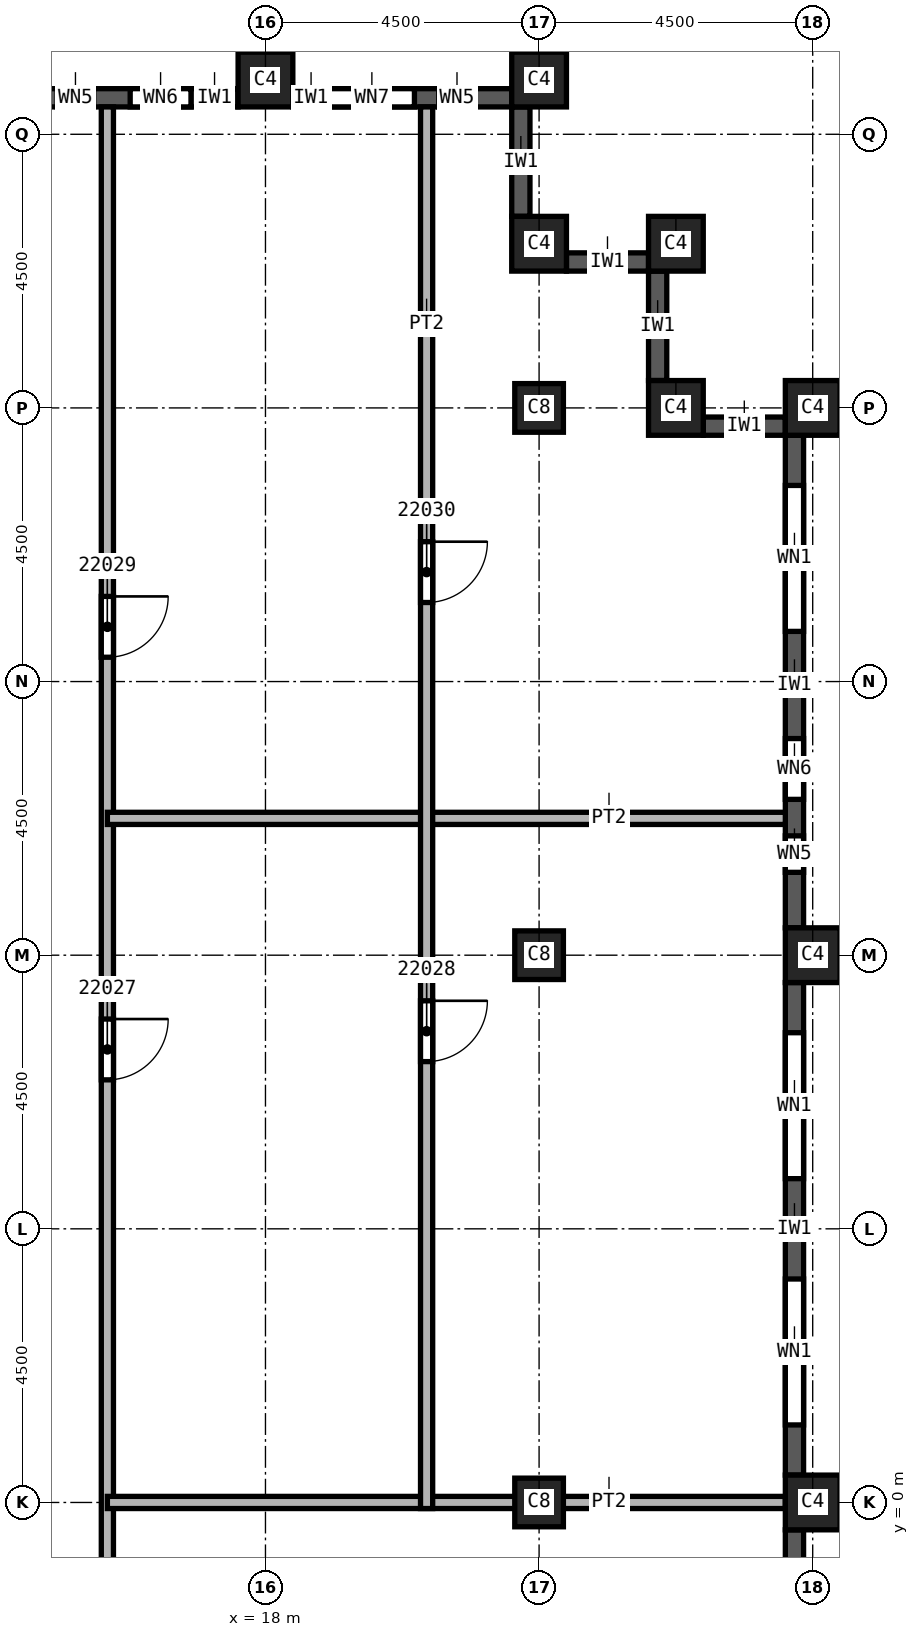
"""IFC4 building model, lengths in metres.
Left out: names, types, materials, properties, quantities, classifications, styles, units other than length and angle.
Written with IfcOpenShell. Run it as: python <this file> out.ifc"""

import sys

from ifc_helpers import new_model, si_unit, direction, frame, frame_2d, origin, origin_2d, place, context, subcontext, project, spatial, rectangle, extrude, element, fill, save


model = new_model("IFC4")
c1 = context("Model", 3, precision=1e-05, world=origin(), true_north=direction((0.0, 1.0)))
c2 = subcontext(c1, "Body", "Model", "MODEL_VIEW")
j1 = project(units=[si_unit("LENGTHUNIT", "METRE"), si_unit("PLANEANGLEUNIT", "RADIAN")], contexts=[c1])
p1 = place(None, origin())
s1 = spatial("IfcSite", under=j1, at=p1, CompositionType="ELEMENT")
p2 = place(p1, origin())
s2 = spatial("IfcBuilding", under=s1, at=p2, CompositionType="ELEMENT")
p3 = place(p2, frame((0.0, 0.0, 312.0)))
s3 = spatial("IfcBuildingStorey", under=s2, at=p3, CompositionType="ELEMENT", Elevation=312.0)
for number, where, z_axis, x_axis in (
    (1, (22.5, 0.0, 0.0), (0.0, 0.0, 1.0), (1.0, 0.0, 0.0)),
    (2, (22.5, 9.0, 0.0), (0.0, 0.0, 1.0), (1.0, 0.0, 0.0)),
    (3, (22.5, 18.0, 0.0), (0.0, 0.0, 1.0), (1.0, 0.0, 0.0)),
):
    element("IfcColumn", number, at=place(p3, frame(where, z_axis=z_axis, x_axis=x_axis)), inside=s3, PredefinedType="COLUMN", context=c2, shape_type="SweptSolid", body=[
        extrude(rectangle(XDim=0.8, YDim=0.8, at=origin_2d()), origin(), (0.0, 0.0, 1.0), 3.74),
    ])
for number, where, z_axis, x_axis in (
    (4, (27.0, 0.0, 0.0), (0.0, 0.0, 1.0), (0.0, 1.0, 0.0)),
    (5, (27.0, 9.0, 0.0), (0.0, 0.0, 1.0), (0.0, 1.0, 0.0)),
    (6, (27.0, 18.0, 0.0), (0.0, 0.0, 1.0), (0.0, 1.0, 0.0)),
    (7, (18.0, 23.4, 0.0), (0.0, 0.0, 1.0), (1.0, 0.0, 0.0)),
    (8, (22.5, 23.4, 0.0), (0.0, 0.0, 1.0), (1.0, 0.0, 0.0)),
    (9, (22.5, 20.7, 0.0), (0.0, 0.0, 1.0), (1.0, 0.0, 0.0)),
    (10, (24.75, 20.7, 0.0), (0.0, 0.0, 1.0), (1.0, 0.0, 0.0)),
    (11, (24.75, 18.0, 0.0), (0.0, 0.0, 1.0), (1.0, 0.0, 0.0)),
):
    element("IfcColumn", number, at=place(p3, frame(where, z_axis=z_axis, x_axis=x_axis)), inside=s3, PredefinedType="COLUMN", context=c2, shape_type="SweptSolid", body=[
        extrude(rectangle(XDim=0.9, YDim=0.9, at=origin_2d()), origin(), (0.0, 0.0, 1.0), 3.74),
    ])
p4 = place(p3, frame((26.7, -8.55, 0.0), z_axis=(0.0, 0.0, 1.0), x_axis=(0.0, 1.0, 0.0)))
e12 = element("IfcWall", 12, at=p4, inside=s3, PredefinedType="SOLIDWALL", context=c2, shape_type="SweptSolid", body=[
    extrude(rectangle(XDim=8.1, YDim=0.3, at=frame_2d((4.05, 0.0))), origin(), (0.0, 0.0, 1.0), 3.14),
])
p5 = place(p4, frame((0.825, 0.0, 0.8)))
e13 = element("IfcOpeningElement", 13, at=p5, cuts=e12, PredefinedType="OPENING", context=c2, shape_type="SweptSolid", body=[
    extrude(rectangle(XDim=2.4, YDim=1.95, at=frame_2d((1.2, 0.975))), frame((0.0, 0.15, 0.0), z_axis=(0.0, -1.0, 0.0), x_axis=(1.0, 0.0, 0.0)), (0.0, 0.0, 1.0), 0.3),
])
p6 = place(p4, frame((4.875, 0.0, 0.8)))
e14 = element("IfcOpeningElement", 14, at=p6, cuts=e12, PredefinedType="OPENING", context=c2, shape_type="SweptSolid", body=[
    extrude(rectangle(XDim=2.4, YDim=1.95, at=frame_2d((1.2, 0.975))), frame((0.0, 0.15, 0.0), z_axis=(0.0, -1.0, 0.0), x_axis=(1.0, 0.0, 0.0)), (0.0, 0.0, 1.0), 0.3),
])
p7 = place(p3, frame((26.7, 0.45, 0.0), z_axis=(0.0, 0.0, 1.0), x_axis=(0.0, 1.0, 0.0)))
e15 = element("IfcWall", 15, at=p7, inside=s3, PredefinedType="SOLIDWALL", context=c2, shape_type="SweptSolid", body=[
    extrude(rectangle(XDim=8.1, YDim=0.3, at=frame_2d((4.05, 0.0))), origin(), (0.0, 0.0, 1.0), 3.14),
])
p8 = place(p7, frame((0.825, 0.0, 0.8)))
e16 = element("IfcOpeningElement", 16, at=p8, cuts=e15, PredefinedType="OPENING", context=c2, shape_type="SweptSolid", body=[
    extrude(rectangle(XDim=2.4, YDim=1.95, at=frame_2d((1.2, 0.975))), frame((0.0, 0.15, 0.0), z_axis=(0.0, -1.0, 0.0), x_axis=(1.0, 0.0, 0.0)), (0.0, 0.0, 1.0), 0.3),
])
p9 = place(p7, frame((4.875, 0.0, 0.8)))
e17 = element("IfcOpeningElement", 17, at=p9, cuts=e15, PredefinedType="OPENING", context=c2, shape_type="SweptSolid", body=[
    extrude(rectangle(XDim=2.4, YDim=1.95, at=frame_2d((1.2, 0.975))), frame((0.0, 0.15, 0.0), z_axis=(0.0, -1.0, 0.0), x_axis=(1.0, 0.0, 0.0)), (0.0, 0.0, 1.0), 0.3),
])
p10 = place(p3, frame((26.7, 9.45, 0.0), z_axis=(0.0, 0.0, 1.0), x_axis=(0.0, 1.0, 0.0)))
e18 = element("IfcWall", 18, at=p10, inside=s3, PredefinedType="SOLIDWALL", context=c2, shape_type="SweptSolid", body=[
    extrude(rectangle(XDim=8.1, YDim=0.3, at=frame_2d((4.05, 0.0))), origin(), (0.0, 0.0, 1.0), 3.14),
])
p11 = place(p10, frame((4.875, 0.0, 0.8)))
e19 = element("IfcOpeningElement", 19, at=p11, cuts=e18, PredefinedType="OPENING", context=c2, shape_type="SweptSolid", body=[
    extrude(rectangle(XDim=2.4, YDim=1.95, at=frame_2d((1.2, 0.975))), frame((0.0, 0.15, 0.0), z_axis=(0.0, -1.0, 0.0), x_axis=(1.0, 0.0, 0.0)), (0.0, 0.0, 1.0), 0.3),
])
p12 = place(p10, frame((0.913, 0.0, 0.8)))
e20 = element("IfcOpeningElement", 20, at=p12, cuts=e18, PredefinedType="OPENING", context=c2, shape_type="SweptSolid", body=[
    extrude(rectangle(XDim=0.6, YDim=1.95, at=frame_2d((0.3, 0.975))), frame((0.0, 0.15, 0.0), z_axis=(0.0, -1.0, 0.0), x_axis=(1.0, 0.0, 0.0)), (0.0, 0.0, 1.0), 0.3),
])
p13 = place(p10, frame((2.113, 0.0, 0.8)))
e21 = element("IfcOpeningElement", 21, at=p13, cuts=e18, PredefinedType="OPENING", context=c2, shape_type="SweptSolid", body=[
    extrude(rectangle(XDim=1.0, YDim=1.95, at=frame_2d((0.5, 0.975))), frame((0.0, 0.15, 0.0), z_axis=(0.0, -1.0, 0.0), x_axis=(1.0, 0.0, 0.0)), (0.0, 0.0, 1.0), 0.3),
])
p14 = place(p3, frame((26.55, 17.7, 0.0), z_axis=(0.0, 0.0, 1.0), x_axis=(-1.0, 0.0, 0.0)))
e22 = element("IfcWall", 22, at=p14, inside=s3, PredefinedType="SOLIDWALL", context=c2, shape_type="SweptSolid", body=[
    extrude(rectangle(XDim=1.35, YDim=0.3, at=frame_2d((0.675, 0.0))), origin(), (0.0, 0.0, 1.0), 3.14),
])
p15 = place(p3, frame((24.45, 18.45, 0.0), z_axis=(0.0, 0.0, 1.0), x_axis=(0.0, 1.0, 0.0)))
e23 = element("IfcWall", 23, at=p15, inside=s3, PredefinedType="SOLIDWALL", context=c2, shape_type="SweptSolid", body=[
    extrude(rectangle(XDim=1.8, YDim=0.3, at=frame_2d((0.9, 0.0))), origin(), (0.0, 0.0, 1.0), 3.14),
])
p16 = place(p3, frame((24.3, 20.4, 0.0), z_axis=(0.0, 0.0, 1.0), x_axis=(-1.0, 0.0, 0.0)))
e24 = element("IfcWall", 24, at=p16, inside=s3, PredefinedType="SOLIDWALL", context=c2, shape_type="SweptSolid", body=[
    extrude(rectangle(XDim=1.35, YDim=0.3, at=frame_2d((0.675, 0.0))), origin(), (0.0, 0.0, 1.0), 3.14),
])
p17 = place(p3, frame((22.2, 21.15, 0.0), z_axis=(0.0, 0.0, 1.0), x_axis=(0.0, 1.0, 0.0)))
e25 = element("IfcWall", 25, at=p17, inside=s3, PredefinedType="SOLIDWALL", context=c2, shape_type="SweptSolid", body=[
    extrude(rectangle(XDim=1.8, YDim=0.3, at=frame_2d((0.9, 0.0))), origin(), (0.0, 0.0, 1.0), 3.14),
])
p18 = place(p3, frame((22.05, 23.1, 0.0), z_axis=(0.0, 0.0, 1.0), x_axis=(-1.0, 0.0, 0.0)))
e26 = element("IfcWall", 26, at=p18, inside=s3, PredefinedType="SOLIDWALL", context=c2, shape_type="SweptSolid", body=[
    extrude(rectangle(XDim=3.6, YDim=0.3, at=frame_2d((1.8, 0.0))), origin(), (0.0, 0.0, 1.0), 3.14),
])
p19 = place(p18, frame((0.6, 0.0, 0.8)))
e27 = element("IfcOpeningElement", 27, at=p19, cuts=e26, PredefinedType="OPENING", context=c2, shape_type="SweptSolid", body=[
    extrude(rectangle(XDim=0.6, YDim=1.95, at=frame_2d((0.3, 0.975))), frame((0.0, 0.15, 0.0), z_axis=(0.0, -1.0, 0.0), x_axis=(1.0, 0.0, 0.0)), (0.0, 0.0, 1.0), 0.3),
])
p20 = place(p18, frame((1.6, 0.0, 0.8)))
e28 = element("IfcOpeningElement", 28, at=p20, cuts=e26, PredefinedType="OPENING", context=c2, shape_type="SweptSolid", body=[
    extrude(rectangle(XDim=1.4, YDim=1.95, at=frame_2d((0.7, 0.975))), frame((0.0, 0.15, 0.0), z_axis=(0.0, -1.0, 0.0), x_axis=(1.0, 0.0, 0.0)), (0.0, 0.0, 1.0), 0.3),
])
p21 = place(p3, frame((17.55, 23.1, 0.0), z_axis=(0.0, 0.0, 1.0), x_axis=(-1.0, 0.0, 0.0)))
e29 = element("IfcWall", 29, at=p21, inside=s3, PredefinedType="SOLIDWALL", context=c2, shape_type="SweptSolid", body=[
    extrude(rectangle(XDim=3.6, YDim=0.3, at=frame_2d((1.8, 0.0))), origin(), (0.0, 0.0, 1.0), 3.14),
])
p22 = place(p21, frame((0.775, 0.0, 0.8)))
e30 = element("IfcOpeningElement", 30, at=p22, cuts=e29, PredefinedType="OPENING", context=c2, shape_type="SweptSolid", body=[
    extrude(rectangle(XDim=1.0, YDim=1.95, at=frame_2d((0.5, 0.975))), frame((0.0, 0.15, 0.0), z_axis=(0.0, -1.0, 0.0), x_axis=(1.0, 0.0, 0.0)), (0.0, 0.0, 1.0), 0.3),
])
p23 = place(p21, frame((2.375, 0.0, 0.8)))
e31 = element("IfcOpeningElement", 31, at=p23, cuts=e29, PredefinedType="OPENING", context=c2, shape_type="SweptSolid", body=[
    extrude(rectangle(XDim=0.6, YDim=1.95, at=frame_2d((0.3, 0.975))), frame((0.0, 0.15, 0.0), z_axis=(0.0, -1.0, 0.0), x_axis=(1.0, 0.0, 0.0)), (0.0, 0.0, 1.0), 0.3),
])
p24 = place(p3, frame((15.4, 22.95, 0.0), z_axis=(0.0, 0.0, 1.0), x_axis=(0.0, -1.0, 0.0)))
e32 = element("IfcWall", 32, at=p24, inside=s3, PredefinedType="PARTITIONING", context=c2, shape_type="SweptSolid", body=[
    extrude(rectangle(XDim=45.9, YDim=0.2, at=frame_2d((22.95, 0.0))), origin(), (0.0, 0.0, 1.0), 3.74),
])
p25 = place(p24, frame((15.0, 0.0, 0.0)))
e33 = element("IfcOpeningElement", 33, at=p25, cuts=e32, PredefinedType="OPENING", context=c2, shape_type="SweptSolid", body=[
    extrude(rectangle(XDim=1.0, YDim=2.1, at=frame_2d((0.5, 1.05))), frame((0.0, 0.1, 0.0), z_axis=(0.0, -1.0, 0.0), x_axis=(1.0, 0.0, 0.0)), (0.0, 0.0, 1.0), 0.2),
])
p26 = place(p24, frame((8.05, 0.0, 0.0)))
e34 = element("IfcOpeningElement", 34, at=p26, cuts=e32, PredefinedType="OPENING", context=c2, shape_type="SweptSolid", body=[
    extrude(rectangle(XDim=1.0, YDim=2.1, at=frame_2d((0.5, 1.05))), frame((0.0, 0.1, 0.0), z_axis=(0.0, -1.0, 0.0), x_axis=(1.0, 0.0, 0.0)), (0.0, 0.0, 1.0), 0.2),
])
p27 = place(p24, frame((43.8, 0.0, 0.0)))
e35 = element("IfcOpeningElement", 35, at=p27, cuts=e32, PredefinedType="OPENING", context=c2, shape_type="SweptSolid", body=[
    extrude(rectangle(XDim=1.0, YDim=2.1, at=frame_2d((0.5, 1.05))), frame((0.0, 0.1, 0.0), z_axis=(0.0, -1.0, 0.0), x_axis=(1.0, 0.0, 0.0)), (0.0, 0.0, 1.0), 0.2),
])
p28 = place(p24, frame((30.3, 0.0, 0.0)))
e36 = element("IfcOpeningElement", 36, at=p28, cuts=e32, PredefinedType="OPENING", context=c2, shape_type="SweptSolid", body=[
    extrude(rectangle(XDim=1.0, YDim=2.1, at=frame_2d((0.5, 1.05))), frame((0.0, 0.1, 0.0), z_axis=(0.0, -1.0, 0.0), x_axis=(1.0, 0.0, 0.0)), (0.0, 0.0, 1.0), 0.2),
])
for number, where, z_axis, x_axis in (
    (37, (15.4, 11.25, 0.0), (0.0, 0.0, 1.0), (1.0, 0.0, 0.0)),
    (38, (26.55, 0.0, 0.0), (0.0, 0.0, 1.0), (-1.0, 0.0, 0.0)),
):
    element("IfcWall", number, at=place(p3, frame(where, z_axis=z_axis, x_axis=x_axis)), inside=s3, PredefinedType="PARTITIONING", context=c2, shape_type="SweptSolid", body=[
        extrude(rectangle(XDim=11.15, YDim=0.2, at=frame_2d((5.575, 0.0))), origin(), (0.0, 0.0, 1.0), 3.74),
    ])
p29 = place(p3, frame((20.65, 22.95, 0.0), z_axis=(0.0, 0.0, 1.0), x_axis=(0.0, -1.0, 0.0)))
e39 = element("IfcWall", 39, at=p29, inside=s3, PredefinedType="PARTITIONING", context=c2, shape_type="SweptSolid", body=[
    extrude(rectangle(XDim=23.05, YDim=0.2, at=frame_2d((11.525, 0.0))), origin(), (0.0, 0.0, 1.0), 3.74),
])
p30 = place(p29, frame((14.7, 0.0, 0.0)))
e40 = element("IfcOpeningElement", 40, at=p30, cuts=e39, PredefinedType="OPENING", context=c2, shape_type="SweptSolid", body=[
    extrude(rectangle(XDim=1.0, YDim=2.1, at=frame_2d((0.5, 1.05))), frame((0.0, 0.1, 0.0), z_axis=(0.0, -1.0, 0.0), x_axis=(1.0, 0.0, 0.0)), (0.0, 0.0, 1.0), 0.2),
])
p31 = place(p29, frame((7.15, 0.0, 0.0)))
e41 = element("IfcOpeningElement", 41, at=p31, cuts=e39, PredefinedType="OPENING", context=c2, shape_type="SweptSolid", body=[
    extrude(rectangle(XDim=1.0, YDim=2.1, at=frame_2d((0.5, 1.05))), frame((0.0, 0.1, 0.0), z_axis=(0.0, -1.0, 0.0), x_axis=(1.0, 0.0, 0.0)), (0.0, 0.0, 1.0), 0.2),
])
p32 = place(p8, origin())
e42 = element("IfcWindow", 42, at=p32, inside=s3, PartitioningType="SINGLE_PANEL", PredefinedType="WINDOW", context=c2, shape_type="SweptSolid", body=[
    extrude(rectangle(XDim=2.4, YDim=1.95, at=frame_2d((1.2, 0.975))), frame((0.0, 0.03, 0.0), z_axis=(0.0, -1.0, 0.0), x_axis=(1.0, 0.0, 0.0)), (0.0, 0.0, 1.0), 0.06),
])
fill(e16, e42)
p33 = place(p9, origin())
e43 = element("IfcWindow", 43, at=p33, inside=s3, PartitioningType="SINGLE_PANEL", PredefinedType="WINDOW", context=c2, shape_type="SweptSolid", body=[
    extrude(rectangle(XDim=2.4, YDim=1.95, at=frame_2d((1.2, 0.975))), frame((0.0, 0.03, 0.0), z_axis=(0.0, -1.0, 0.0), x_axis=(1.0, 0.0, 0.0)), (0.0, 0.0, 1.0), 0.06),
])
fill(e17, e43)
p34 = place(p11, origin())
e44 = element("IfcWindow", 44, at=p34, inside=s3, PartitioningType="SINGLE_PANEL", PredefinedType="WINDOW", context=c2, shape_type="SweptSolid", body=[
    extrude(rectangle(XDim=2.4, YDim=1.95, at=frame_2d((1.2, 0.975))), frame((0.0, 0.03, 0.0), z_axis=(0.0, -1.0, 0.0), x_axis=(1.0, 0.0, 0.0)), (0.0, 0.0, 1.0), 0.06),
])
fill(e19, e44)
p35 = place(p25, origin())
e45 = element("IfcDoor", 45, at=p35, inside=s3, OperationType="SINGLE_SWING_RIGHT", PredefinedType="DOOR", context=c2, shape_type="SweptSolid", body=[
    extrude(rectangle(XDim=1.0, YDim=2.1, at=frame_2d((0.5, 1.05))), frame((0.0, 0.025, 0.0), z_axis=(0.0, -1.0, 0.0), x_axis=(1.0, 0.0, 0.0)), (0.0, 0.0, 1.0), 0.05),
])
fill(e33, e45)
p36 = place(p30, origin())
e46 = element("IfcDoor", 46, at=p36, inside=s3, OperationType="SINGLE_SWING_LEFT", PredefinedType="DOOR", context=c2, shape_type="SweptSolid", body=[
    extrude(rectangle(XDim=1.0, YDim=2.1, at=frame_2d((0.5, 1.05))), frame((0.0, 0.025, 0.0), z_axis=(0.0, -1.0, 0.0), x_axis=(1.0, 0.0, 0.0)), (0.0, 0.0, 1.0), 0.05),
])
fill(e40, e46)
p37 = place(p26, origin())
e47 = element("IfcDoor", 47, at=p37, inside=s3, OperationType="SINGLE_SWING_RIGHT", PredefinedType="DOOR", context=c2, shape_type="SweptSolid", body=[
    extrude(rectangle(XDim=1.0, YDim=2.1, at=frame_2d((0.5, 1.05))), frame((0.0, 0.025, 0.0), z_axis=(0.0, -1.0, 0.0), x_axis=(1.0, 0.0, 0.0)), (0.0, 0.0, 1.0), 0.05),
])
fill(e34, e47)
p38 = place(p31, origin())
e48 = element("IfcDoor", 48, at=p38, inside=s3, OperationType="SINGLE_SWING_LEFT", PredefinedType="DOOR", context=c2, shape_type="SweptSolid", body=[
    extrude(rectangle(XDim=1.0, YDim=2.1, at=frame_2d((0.5, 1.05))), frame((0.0, 0.025, 0.0), z_axis=(0.0, -1.0, 0.0), x_axis=(1.0, 0.0, 0.0)), (0.0, 0.0, 1.0), 0.05),
])
fill(e41, e48)
p39 = place(p12, origin())
e49 = element("IfcWindow", 49, at=p39, inside=s3, PartitioningType="SINGLE_PANEL", PredefinedType="WINDOW", context=c2, shape_type="SweptSolid", body=[
    extrude(rectangle(XDim=0.6, YDim=1.95, at=frame_2d((0.3, 0.975))), frame((0.0, 0.03, 0.0), z_axis=(0.0, -1.0, 0.0), x_axis=(1.0, 0.0, 0.0)), (0.0, 0.0, 1.0), 0.06),
])
fill(e20, e49)
p40 = place(p13, origin())
e50 = element("IfcWindow", 50, at=p40, inside=s3, PartitioningType="SINGLE_PANEL", PredefinedType="WINDOW", context=c2, shape_type="SweptSolid", body=[
    extrude(rectangle(XDim=1.0, YDim=1.95, at=frame_2d((0.5, 0.975))), frame((0.0, 0.03, 0.0), z_axis=(0.0, -1.0, 0.0), x_axis=(1.0, 0.0, 0.0)), (0.0, 0.0, 1.0), 0.06),
])
fill(e21, e50)
p41 = place(p19, origin())
e51 = element("IfcWindow", 51, at=p41, inside=s3, PartitioningType="SINGLE_PANEL", PredefinedType="WINDOW", context=c2, shape_type="SweptSolid", body=[
    extrude(rectangle(XDim=0.6, YDim=1.95, at=frame_2d((0.3, 0.975))), frame((0.0, 0.03, 0.0), z_axis=(0.0, -1.0, 0.0), x_axis=(1.0, 0.0, 0.0)), (0.0, 0.0, 1.0), 0.06),
])
fill(e27, e51)
p42 = place(p20, origin())
e52 = element("IfcWindow", 52, at=p42, inside=s3, PartitioningType="SINGLE_PANEL", PredefinedType="WINDOW", context=c2, shape_type="SweptSolid", body=[
    extrude(rectangle(XDim=1.4, YDim=1.95, at=frame_2d((0.7, 0.975))), frame((0.0, 0.03, 0.0), z_axis=(0.0, -1.0, 0.0), x_axis=(1.0, 0.0, 0.0)), (0.0, 0.0, 1.0), 0.06),
])
fill(e28, e52)
p43 = place(p22, origin())
e53 = element("IfcWindow", 53, at=p43, inside=s3, PartitioningType="SINGLE_PANEL", PredefinedType="WINDOW", context=c2, shape_type="SweptSolid", body=[
    extrude(rectangle(XDim=1.0, YDim=1.95, at=frame_2d((0.5, 0.975))), frame((0.0, 0.03, 0.0), z_axis=(0.0, -1.0, 0.0), x_axis=(1.0, 0.0, 0.0)), (0.0, 0.0, 1.0), 0.06),
])
fill(e30, e53)
p44 = place(p23, origin())
e54 = element("IfcWindow", 54, at=p44, inside=s3, PartitioningType="SINGLE_PANEL", PredefinedType="WINDOW", context=c2, shape_type="SweptSolid", body=[
    extrude(rectangle(XDim=0.6, YDim=1.95, at=frame_2d((0.3, 0.975))), frame((0.0, 0.03, 0.0), z_axis=(0.0, -1.0, 0.0), x_axis=(1.0, 0.0, 0.0)), (0.0, 0.0, 1.0), 0.06),
])
fill(e31, e54)
save(model, sys.argv[1])
